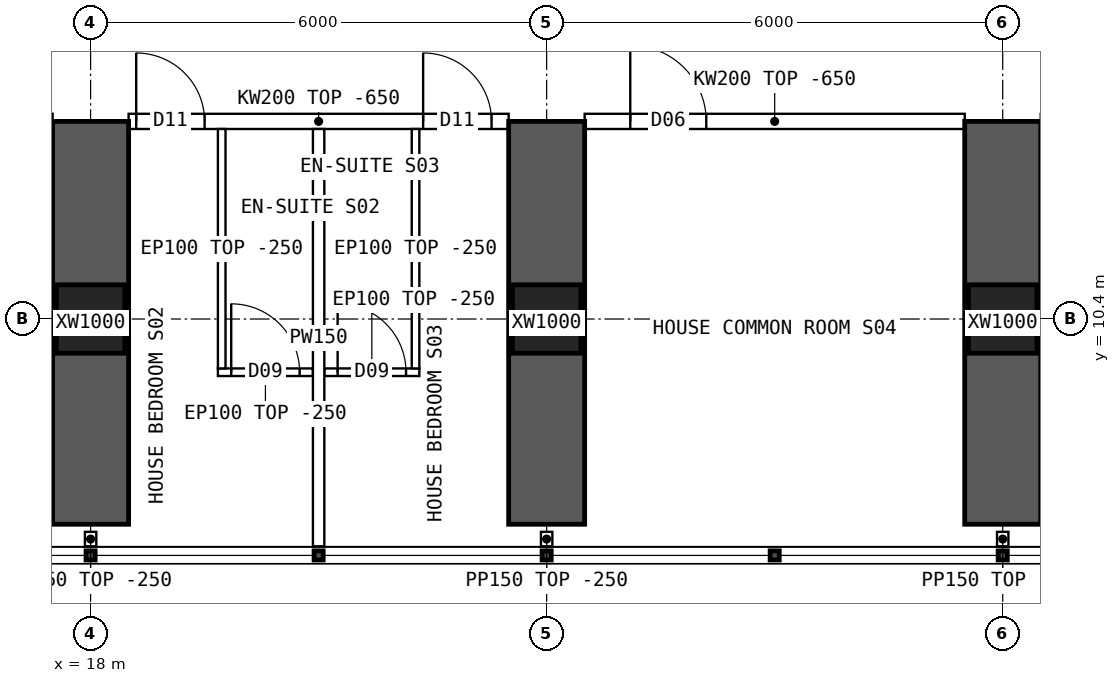
"""IFC4 building model, lengths in metres.
Left out: names, types, materials, properties, quantities, classifications, styles, units other than length and angle.
Written with IfcOpenShell. Run it as: python <this file> out.ifc"""

import sys

from ifc_helpers import new_model, si_unit, direction, frame, frame_2d, origin, origin_2d, place, context, subcontext, project, spatial, polyline, rectangle, hollow_rectangle, outline, extrude, element, fill, save


model = new_model("IFC4")
c1 = context("Model", 3, precision=1e-05, world=origin(), true_north=direction((0.0, 1.0)))
c2 = subcontext(c1, "Body", "Model", "MODEL_VIEW")
j1 = project(units=[si_unit("LENGTHUNIT", "METRE"), si_unit("PLANEANGLEUNIT", "RADIAN")], contexts=[c1])
p1 = place(None, origin())
s1 = spatial("IfcSite", under=j1, at=p1, CompositionType="ELEMENT")
p2 = place(p1, origin())
s2 = spatial("IfcBuilding", under=s1, at=p2, CompositionType="ELEMENT")
p3 = place(p2, frame((0.0, 0.0, 57.7)))
s3 = spatial("IfcBuildingStorey", under=s2, at=p3, CompositionType="ELEMENT", Elevation=57.7)
for number, where, z_axis, x_axis in (
    (1, (18.0, 10.4, 0.0), (0.0, 0.0, 1.0), (1.0, 0.0, 0.0)),
    (2, (24.0, 10.4, 0.0), (0.0, 0.0, 1.0), (1.0, 0.0, 0.0)),
    (3, (30.0, 10.4, 0.0), (0.0, 0.0, 1.0), (1.0, 0.0, 0.0)),
):
    element("IfcColumn", number, at=place(p3, frame(where, z_axis=z_axis, x_axis=x_axis)), inside=s3, PredefinedType="COLUMN", context=c2, shape_type="SweptSolid", body=[
        extrude(hollow_rectangle(XDim=0.9, YDim=0.9, WallThickness=0.09, at=origin_2d()), origin(), (0.0, 0.0, 1.0), 3.75),
    ])
for number, where, z_axis, x_axis in (
    (4, (18.0, 7.7, 0.0), (0.0, 0.0, 1.0), (0.0, 1.0, 0.0)),
    (5, (24.0, 7.7, 0.0), (0.0, 0.0, 1.0), (0.0, 1.0, 0.0)),
    (6, (30.0, 7.7, 0.0), (0.0, 0.0, 1.0), (0.0, 1.0, 0.0)),
):
    element("IfcWall", number, at=place(p3, frame(where, z_axis=z_axis, x_axis=x_axis)), inside=s3, PredefinedType="SHEAR", context=c2, shape_type="SweptSolid", body=[
        extrude(rectangle(XDim=5.3, YDim=1.0, at=frame_2d((2.65, 0.0))), origin(), (0.0, 0.0, 1.0), 3.75),
    ])
p4 = place(p3, frame((18.5, 13.0, 0.0), z_axis=(0.0, 0.0, 1.0), x_axis=(1.0, 0.0, 0.0)))
e7 = element("IfcWall", 7, at=p4, inside=s3, PredefinedType="SOLIDWALL", context=c2, shape_type="SweptSolid", body=[
    extrude(outline(polyline([(0.0, 0.0), (5.0, 0.0), (5.0, 3.1), (0.0, 3.1), (0.0, 0.0)])), frame((0.0, 0.1, 0.0), z_axis=(0.0, -1.0, 0.0), x_axis=(1.0, 0.0, 0.0)), (0.0, 0.0, 1.0), 0.2),
])
p5 = place(p4, frame((0.1, 0.0, 0.0)))
e8 = element("IfcOpeningElement", 8, at=p5, cuts=e7, PredefinedType="OPENING", context=c2, shape_type="SweptSolid", body=[
    extrude(rectangle(XDim=0.9, YDim=2.1, at=frame_2d((0.45, 1.05))), frame((0.0, 0.11, 0.0), z_axis=(0.0, -1.0, 0.0), x_axis=(1.0, 0.0, 0.0)), (0.0, 0.0, 1.0), 0.22),
])
p6 = place(p4, frame((3.875, 0.0, 0.0)))
e9 = element("IfcOpeningElement", 9, at=p6, cuts=e7, PredefinedType="OPENING", context=c2, shape_type="SweptSolid", body=[
    extrude(rectangle(XDim=0.9, YDim=2.1, at=frame_2d((0.45, 1.05))), frame((0.0, 0.11, 0.0), z_axis=(0.0, -1.0, 0.0), x_axis=(1.0, 0.0, 0.0)), (0.0, 0.0, 1.0), 0.22),
])
p7 = place(p3, frame((24.5, 13.0, 0.0), z_axis=(0.0, 0.0, 1.0), x_axis=(1.0, 0.0, 0.0)))
e10 = element("IfcWall", 10, at=p7, inside=s3, PredefinedType="SOLIDWALL", context=c2, shape_type="SweptSolid", body=[
    extrude(outline(polyline([(0.0, 0.0), (5.0, 0.0), (5.0, 3.1), (0.0, 3.1), (0.0, 0.0)])), frame((0.0, 0.1, 0.0), z_axis=(0.0, -1.0, 0.0), x_axis=(1.0, 0.0, 0.0)), (0.0, 0.0, 1.0), 0.2),
])
p8 = place(p7, frame((0.6, 0.0, 0.0)))
e11 = element("IfcOpeningElement", 11, at=p8, cuts=e10, PredefinedType="OPENING", context=c2, shape_type="SweptSolid", body=[
    extrude(rectangle(XDim=1.0, YDim=2.1, at=frame_2d((0.5, 1.05))), frame((0.0, 0.11, 0.0), z_axis=(0.0, -1.0, 0.0), x_axis=(1.0, 0.0, 0.0)), (0.0, 0.0, 1.0), 0.22),
])
p9 = place(p3, frame((21.0, 7.41, 0.0), z_axis=(0.0, 0.0, 1.0), x_axis=(0.0, 1.0, 0.0)))
e12 = element("IfcWall", 12, at=p9, inside=s3, PredefinedType="PARTITIONING", context=c2, shape_type="SweptSolid", body=[
    extrude(outline(polyline([(0.0, 0.0), (5.49, 0.0), (5.49, 3.1), (5.442, 3.1), (5.44, 3.5), (3.192, 3.5), (3.19, 3.1), (2.792, 3.1), (2.79, 3.5), (0.0, 3.5), (0.0, 0.0)])), frame((0.0, 0.075, 0.0), z_axis=(0.0, -1.0, 0.0), x_axis=(1.0, 0.0, 0.0)), (0.0, 0.0, 1.0), 0.15),
])
p10 = place(p3, frame((20.925, 9.7, 0.0), z_axis=(0.0, 0.0, 1.0), x_axis=(-1.0, 0.0, 0.0)))
e13 = element("IfcWall", 13, at=p10, inside=s3, PredefinedType="PARTITIONING", context=c2, shape_type="SweptSolid", body=[
    extrude(rectangle(XDim=1.25, YDim=0.1, at=frame_2d((0.625, 0.0))), origin(), (0.0, 0.0, 1.0), 3.5),
])
p11 = place(p10, frame((0.175, 0.0, 0.0)))
e14 = element("IfcOpeningElement", 14, at=p11, cuts=e13, PredefinedType="OPENING", context=c2, shape_type="SweptSolid", body=[
    extrude(rectangle(XDim=0.9, YDim=2.1, at=frame_2d((0.45, 1.05))), frame((0.0, 0.06, 0.0), z_axis=(0.0, -1.0, 0.0), x_axis=(1.0, 0.0, 0.0)), (0.0, 0.0, 1.0), 0.12),
])
p12 = place(p3, frame((19.725, 9.75, 0.0), z_axis=(0.0, 0.0, 1.0), x_axis=(0.0, 1.0, 0.0)))
e15 = element("IfcWall", 15, at=p12, inside=s3, PredefinedType="PARTITIONING", context=c2, shape_type="SweptSolid", body=[
    extrude(outline(polyline([(0.0, 0.0), (3.15, 0.0), (3.15, 3.1), (3.102, 3.1), (3.1, 3.5), (0.852, 3.5), (0.85, 3.1), (0.452, 3.1), (0.45, 3.5), (0.0, 3.5), (0.0, 0.0)])), frame((0.0, 0.05, 0.0), z_axis=(0.0, -1.0, 0.0), x_axis=(1.0, 0.0, 0.0)), (0.0, 0.0, 1.0), 0.1),
])
p13 = place(p3, frame((22.325, 9.7, 0.0), z_axis=(0.0, 0.0, 1.0), x_axis=(-1.0, 0.0, 0.0)))
e16 = element("IfcWall", 16, at=p13, inside=s3, PredefinedType="PARTITIONING", context=c2, shape_type="SweptSolid", body=[
    extrude(rectangle(XDim=1.25, YDim=0.1, at=frame_2d((0.625, 0.0))), origin(), (0.0, 0.0, 1.0), 3.5),
])
p14 = place(p13, frame((0.175, 0.0, 0.0)))
e17 = element("IfcOpeningElement", 17, at=p14, cuts=e16, PredefinedType="OPENING", context=c2, shape_type="SweptSolid", body=[
    extrude(rectangle(XDim=0.9, YDim=2.1, at=frame_2d((0.45, 1.05))), frame((0.0, 0.06, 0.0), z_axis=(0.0, -1.0, 0.0), x_axis=(1.0, 0.0, 0.0)), (0.0, 0.0, 1.0), 0.12),
])
p15 = place(p3, frame((22.275, 9.75, 0.0), z_axis=(0.0, 0.0, 1.0), x_axis=(0.0, 1.0, 0.0)))
e18 = element("IfcWall", 18, at=p15, inside=s3, PredefinedType="PARTITIONING", context=c2, shape_type="SweptSolid", body=[
    extrude(outline(polyline([(0.0, 0.0), (3.15, 0.0), (3.15, 3.1), (3.102, 3.1), (3.1, 3.5), (0.852, 3.5), (0.85, 3.1), (0.452, 3.1), (0.45, 3.5), (0.0, 3.5), (0.0, 0.0)])), frame((0.0, 0.05, 0.0), z_axis=(0.0, -1.0, 0.0), x_axis=(1.0, 0.0, 0.0)), (0.0, 0.0, 1.0), 0.1),
])
for number, where, z_axis, x_axis in (
    (19, (18.0, 7.6, 0.0), (0.0, 0.0, 1.0), (0.0, -1.0, 0.0)),
    (20, (24.0, 7.6, 0.0), (0.0, 0.0, 1.0), (0.0, -1.0, 0.0)),
    (21, (30.0, 7.6, 0.0), (0.0, 0.0, 1.0), (0.0, -1.0, 0.0)),
):
    element("IfcWall", number, at=place(p3, frame(where, z_axis=z_axis, x_axis=x_axis)), inside=s3, PredefinedType="PARTITIONING", context=c2, shape_type="SweptSolid", body=[
        extrude(rectangle(XDim=0.19, YDim=0.15, at=frame_2d((0.095, 0.0))), origin(), (0.0, 0.0, 1.0), 3.5),
    ])
p16 = place(p11, origin())
e22 = element("IfcDoor", 22, at=p16, inside=s3, OperationType="SINGLE_SWING_RIGHT", PredefinedType="DOOR", context=c2, shape_type="SweptSolid", body=[
    extrude(rectangle(XDim=0.9, YDim=2.1, at=frame_2d((0.45, 1.05))), frame((0.0, 0.025, 0.0), z_axis=(0.0, -1.0, 0.0), x_axis=(1.0, 0.0, 0.0)), (0.0, 0.0, 1.0), 0.05),
])
fill(e14, e22)
p17 = place(p5, origin())
e23 = element("IfcDoor", 23, at=p17, inside=s3, OperationType="SINGLE_SWING_LEFT", PredefinedType="DOOR", context=c2, shape_type="SweptSolid", body=[
    extrude(rectangle(XDim=0.9, YDim=2.1, at=frame_2d((0.45, 1.05))), frame((0.0, 0.025, 0.0), z_axis=(0.0, -1.0, 0.0), x_axis=(1.0, 0.0, 0.0)), (0.0, 0.0, 1.0), 0.05),
])
fill(e8, e23)
p18 = place(p14, origin())
e24 = element("IfcDoor", 24, at=p18, inside=s3, OperationType="SINGLE_SWING_RIGHT", PredefinedType="DOOR", context=c2, shape_type="SweptSolid", body=[
    extrude(rectangle(XDim=0.9, YDim=2.1, at=frame_2d((0.45, 1.05))), frame((0.0, 0.025, 0.0), z_axis=(0.0, -1.0, 0.0), x_axis=(1.0, 0.0, 0.0)), (0.0, 0.0, 1.0), 0.05),
])
fill(e17, e24)
p19 = place(p6, origin())
e25 = element("IfcDoor", 25, at=p19, inside=s3, OperationType="SINGLE_SWING_LEFT", PredefinedType="DOOR", context=c2, shape_type="SweptSolid", body=[
    extrude(rectangle(XDim=0.9, YDim=2.1, at=frame_2d((0.45, 1.05))), frame((0.0, 0.025, 0.0), z_axis=(0.0, -1.0, 0.0), x_axis=(1.0, 0.0, 0.0)), (0.0, 0.0, 1.0), 0.05),
])
fill(e9, e25)
p20 = place(p8, origin())
e26 = element("IfcDoor", 26, at=p20, inside=s3, OperationType="SINGLE_SWING_LEFT", PredefinedType="DOOR", context=c2, shape_type="SweptSolid", body=[
    extrude(rectangle(XDim=1.0, YDim=2.1, at=frame_2d((0.5, 1.05))), frame((0.0, 0.025, 0.0), z_axis=(0.0, -1.0, 0.0), x_axis=(1.0, 0.0, 0.0)), (0.0, 0.0, 1.0), 0.05),
])
fill(e11, e26)
save(model, sys.argv[1])
